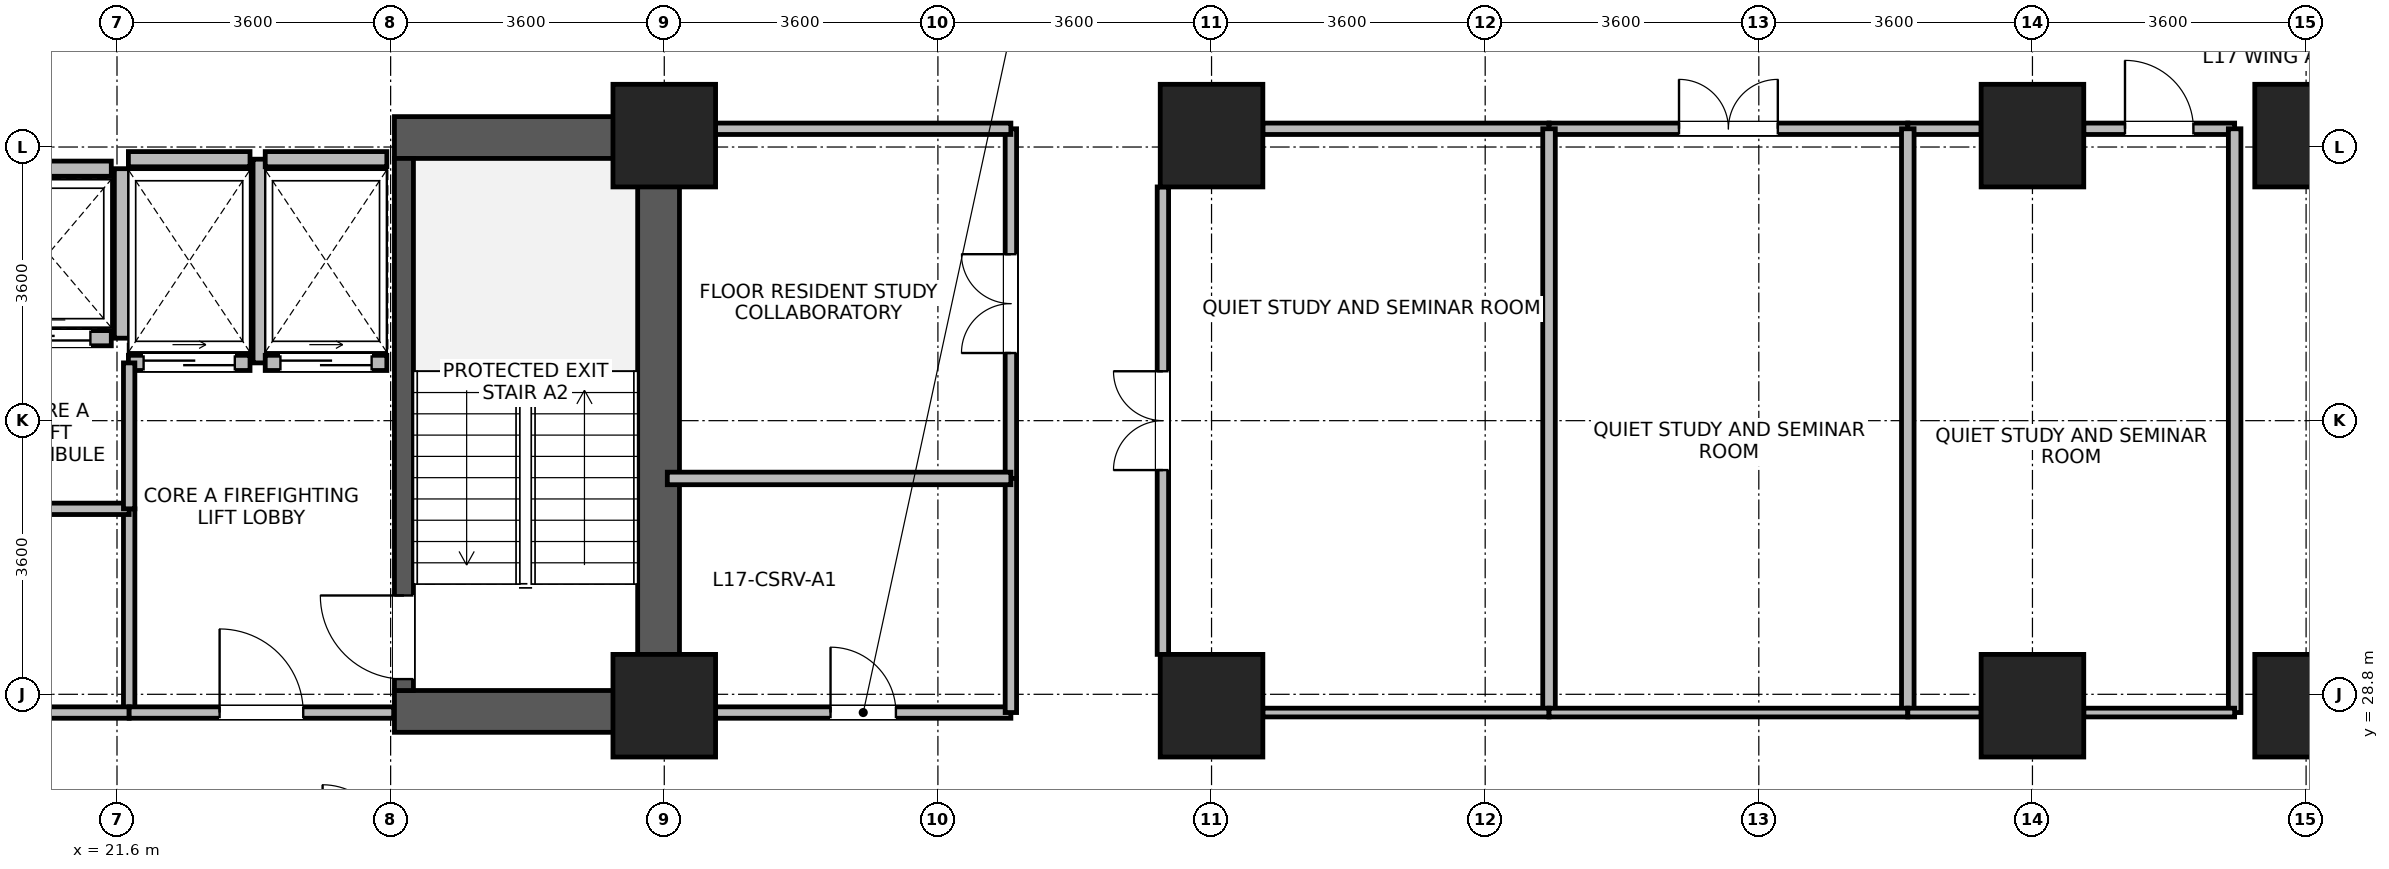
"""IFC4 building model, lengths in metres.
Left out: names, types, materials, properties, quantities, classifications, styles, units other than length and angle.
Written with IfcOpenShell. Run it as: python <this file> out.ifc"""

import sys

from ifc_helpers import new_model, si_unit, direction, frame, frame_2d, origin, origin_2d, place, context, subcontext, project, spatial, rectangle, extrude, source, transform, mapped, element, fill, save


model = new_model("IFC4")
c1 = context("Model", 3, precision=1e-05, world=origin(), true_north=direction((0.0, 1.0)))
c2 = subcontext(c1, "Body", "Model", "MODEL_VIEW")
j1 = project(units=[si_unit("LENGTHUNIT", "METRE"), si_unit("PLANEANGLEUNIT", "RADIAN")], contexts=[c1])
p1 = place(None, origin())
s1 = spatial("IfcSite", under=j1, at=p1, CompositionType="ELEMENT")
p2 = place(p1, origin())
s2 = spatial("IfcBuilding", under=s1, at=p2, CompositionType="ELEMENT")
p3 = place(p2, frame((0.0, 0.0, 69.7)))
s3 = spatial("IfcBuildingStorey", under=s2, at=p3, CompositionType="ELEMENT", Elevation=69.7)
p4 = place(p3, frame((28.725, 28.3, 0.0), z_axis=(0.0, 0.0, 1.0), x_axis=(0.0, 1.0, 0.0)))
e1 = element("IfcWall", 1, at=p4, inside=s3, PredefinedType="SHEAR", context=c2, shape_type="SweptSolid", body=[
    extrude(rectangle(XDim=8.1, YDim=0.55, at=frame_2d((4.05, 0.0))), origin(), (0.0, 0.0, 1.0), 3.34),
])
for number, where, z_axis, x_axis in (
    (2, (25.25, 28.575, 0.0), (0.0, 0.0, 1.0), (1.0, 0.0, 0.0)),
    (3, (25.25, 36.125, 0.0), (0.0, 0.0, 1.0), (1.0, 0.0, 0.0)),
):
    element("IfcWall", number, at=place(p3, frame(where, z_axis=z_axis, x_axis=x_axis)), inside=s3, PredefinedType="SHEAR", context=c2, shape_type="SweptSolid", body=[
        extrude(rectangle(XDim=3.2, YDim=0.55, at=frame_2d((1.6, 0.0))), origin(), (0.0, 0.0, 1.0), 3.34),
    ])
p5 = place(p3, frame((25.375, 28.85, 0.0), z_axis=(0.0, 0.0, 1.0), x_axis=(0.0, 1.0, 0.0)))
e4 = element("IfcWall", 4, at=p5, inside=s3, PredefinedType="SHEAR", context=c2, shape_type="SweptSolid", body=[
    extrude(rectangle(XDim=7.0, YDim=0.25, at=frame_2d((3.5, 0.0))), origin(), (0.0, 0.0, 1.0), 3.34),
])
p6 = place(p5, frame((0.15, 0.0, 0.0)))
e5 = element("IfcOpeningElement", 5, at=p6, cuts=e4, PredefinedType="OPENING", context=c2, shape_type="SweptSolid", body=[
    extrude(rectangle(XDim=1.1, YDim=2.08, at=frame_2d((0.55, 1.04))), frame((0.0, 0.135, 0.0), z_axis=(0.0, -1.0, 0.0), x_axis=(1.0, 0.0, 0.0)), (0.0, 0.0, 1.0), 0.27),
])
m1 = source(origin(), c2, "Body", "SweptSolid", [
    extrude(rectangle(XDim=1.35, YDim=1.35, at=origin_2d()), origin(), (0.0, 0.0, 1.0), 3.7),
])
for number, where, z_axis, x_axis in (
    (6, (28.8, 28.65, 0.0), (0.0, 0.0, 1.0), (1.0, 0.0, 0.0)),
    (7, (28.8, 36.15, 0.0), (0.0, 0.0, 1.0), (1.0, 0.0, 0.0)),
    (8, (36.0, 28.65, 0.0), (0.0, 0.0, 1.0), (1.0, 0.0, 0.0)),
    (9, (36.0, 36.15, 0.0), (0.0, 0.0, 1.0), (1.0, 0.0, 0.0)),
    (10, (46.8, 28.65, 0.0), (0.0, 0.0, 1.0), (1.0, 0.0, 0.0)),
    (11, (46.8, 36.15, 0.0), (0.0, 0.0, 1.0), (1.0, 0.0, 0.0)),
    (12, (50.4, 28.65, 0.0), (0.0, 0.0, 1.0), (1.0, 0.0, 0.0)),
    (13, (50.4, 36.15, 0.0), (0.0, 0.0, 1.0), (1.0, 0.0, 0.0)),
):
    element("IfcColumn", number, at=place(p3, frame(where, z_axis=z_axis, x_axis=x_axis)), inside=s3, PredefinedType="COLUMN", context=c2, shape_type="MappedRepresentation", body=[
        mapped(m1, transform((0.0, 0.0, 0.0), x_axis=(1.0, 0.0, 0.0), y_axis=(0.0, 1.0, 0.0), z_axis=(0.0, 0.0, 1.0), scale=1.0)),
    ])
p7 = place(p3, frame((19.875, 33.485, 0.0), z_axis=(0.0, 0.0, 1.0), x_axis=(1.0, 0.0, 0.0)))
e14 = element("IfcWall", 14, at=p7, inside=s3, PredefinedType="PARTITIONING", context=c2, shape_type="SweptSolid", body=[
    extrude(rectangle(XDim=1.65, YDim=0.2, at=frame_2d((0.825, 0.0))), origin(), (0.0, 0.0, 1.0), 3.32),
])
p8 = place(p7, frame((0.275, 0.0, 0.0)))
e15 = element("IfcOpeningElement", 15, at=p8, cuts=e14, PredefinedType="OPENING", context=c2, shape_type="SweptSolid", body=[
    extrude(rectangle(XDim=1.1, YDim=2.12, at=frame_2d((0.55, 1.06))), frame((0.0, 0.11, 0.0), z_axis=(0.0, -1.0, 0.0), x_axis=(1.0, 0.0, 0.0)), (0.0, 0.0, 1.0), 0.22),
])
p9 = place(p3, frame((19.875, 35.715, 0.0), z_axis=(0.0, 0.0, 1.0), x_axis=(1.0, 0.0, 0.0)))
e16 = element("IfcWall", 16, at=p9, inside=s3, PredefinedType="PARTITIONING", context=c2, shape_type="SweptSolid", body=[
    extrude(rectangle(XDim=1.65, YDim=0.2, at=frame_2d((0.825, 0.0))), origin(), (0.0, 0.0, 1.0), 2.12),
])
p10 = place(p3, frame((21.665, 33.485, 0.0), z_axis=(0.0, 0.0, 1.0), x_axis=(0.0, 1.0, 0.0)))
e17 = element("IfcWall", 17, at=p10, inside=s3, PredefinedType="PARTITIONING", context=c2, shape_type="SweptSolid", body=[
    extrude(rectangle(XDim=2.23, YDim=0.2, at=frame_2d((1.115, 0.0))), origin(), (0.0, 0.0, 1.0), 3.32),
])
p11 = place(p3, frame((21.75, 33.16, 0.0), z_axis=(0.0, 0.0, 1.0), x_axis=(1.0, 0.0, 0.0)))
e18 = element("IfcWall", 18, at=p11, inside=s3, PredefinedType="PARTITIONING", context=c2, shape_type="SweptSolid", body=[
    extrude(rectangle(XDim=1.6, YDim=0.2, at=frame_2d((0.8, 0.0))), origin(), (0.0, 0.0, 1.0), 3.32),
])
p12 = place(p11, frame((0.2, 0.0, 0.0)))
e19 = element("IfcOpeningElement", 19, at=p12, cuts=e18, PredefinedType="OPENING", context=c2, shape_type="SweptSolid", body=[
    extrude(rectangle(XDim=1.2, YDim=2.12, at=frame_2d((0.6, 1.06))), frame((0.0, 0.11, 0.0), z_axis=(0.0, -1.0, 0.0), x_axis=(1.0, 0.0, 0.0)), (0.0, 0.0, 1.0), 0.22),
])
p13 = place(p3, frame((21.75, 35.84, 0.0), z_axis=(0.0, 0.0, 1.0), x_axis=(1.0, 0.0, 0.0)))
e20 = element("IfcWall", 20, at=p13, inside=s3, PredefinedType="PARTITIONING", context=c2, shape_type="SweptSolid", body=[
    extrude(rectangle(XDim=1.6, YDim=0.2, at=frame_2d((0.8, 0.0))), origin(), (0.0, 0.0, 1.0), 2.12),
])
p14 = place(p3, frame((23.49, 33.16, 0.0), z_axis=(0.0, 0.0, 1.0), x_axis=(0.0, 1.0, 0.0)))
e21 = element("IfcWall", 21, at=p14, inside=s3, PredefinedType="PARTITIONING", context=c2, shape_type="SweptSolid", body=[
    extrude(rectangle(XDim=2.68, YDim=0.2, at=frame_2d((1.34, 0.0))), origin(), (0.0, 0.0, 1.0), 3.32),
])
p15 = place(p3, frame((23.55, 33.16, 0.0), z_axis=(0.0, 0.0, 1.0), x_axis=(1.0, 0.0, 0.0)))
e22 = element("IfcWall", 22, at=p15, inside=s3, PredefinedType="PARTITIONING", context=c2, shape_type="SweptSolid", body=[
    extrude(rectangle(XDim=1.6, YDim=0.2, at=frame_2d((0.8, 0.0))), origin(), (0.0, 0.0, 1.0), 3.32),
])
p16 = place(p15, frame((0.2, 0.0, 0.0)))
e23 = element("IfcOpeningElement", 23, at=p16, cuts=e22, PredefinedType="OPENING", context=c2, shape_type="SweptSolid", body=[
    extrude(rectangle(XDim=1.2, YDim=2.12, at=frame_2d((0.6, 1.06))), frame((0.0, 0.11, 0.0), z_axis=(0.0, -1.0, 0.0), x_axis=(1.0, 0.0, 0.0)), (0.0, 0.0, 1.0), 0.22),
])
p17 = place(p3, frame((23.55, 35.84, 0.0), z_axis=(0.0, 0.0, 1.0), x_axis=(1.0, 0.0, 0.0)))
e24 = element("IfcWall", 24, at=p17, inside=s3, PredefinedType="PARTITIONING", context=c2, shape_type="SweptSolid", body=[
    extrude(rectangle(XDim=1.6, YDim=0.2, at=frame_2d((0.8, 0.0))), origin(), (0.0, 0.0, 1.0), 2.12),
])
p18 = place(p3, frame((35.36, 29.325, 0.0), z_axis=(0.0, 0.0, 1.0), x_axis=(0.0, 1.0, 0.0)))
e25 = element("IfcWall", 25, at=p18, inside=s3, PredefinedType="PARTITIONING", context=c2, shape_type="SweptSolid", body=[
    extrude(rectangle(XDim=6.15, YDim=0.15, at=frame_2d((3.075, 0.0))), origin(), (0.0, 0.0, 1.0), 3.32),
])
p19 = place(p18, frame((2.425, 0.0, 0.0)))
e26 = element("IfcOpeningElement", 26, at=p19, cuts=e25, PredefinedType="OPENING", context=c2, shape_type="SweptSolid", body=[
    extrude(rectangle(XDim=1.3, YDim=2.12, at=frame_2d((0.65, 1.06))), frame((0.0, 0.085, 0.0), z_axis=(0.0, -1.0, 0.0), x_axis=(1.0, 0.0, 0.0)), (0.0, 0.0, 1.0), 0.17),
])
p20 = place(p3, frame((36.675, 36.24, 0.0), z_axis=(0.0, 0.0, 1.0), x_axis=(1.0, 0.0, 0.0)))
e27 = element("IfcWall", 27, at=p20, inside=s3, PredefinedType="PARTITIONING", context=c2, shape_type="SweptSolid", body=[
    extrude(rectangle(XDim=3.765, YDim=0.15, at=frame_2d((1.882, 0.0))), origin(), (0.0, 0.0, 1.0), 2.67),
])
p21 = place(p3, frame((40.44, 36.24, 0.0), z_axis=(0.0, 0.0, 1.0), x_axis=(1.0, 0.0, 0.0)))
e28 = element("IfcWall", 28, at=p21, inside=s3, PredefinedType="PARTITIONING", context=c2, shape_type="SweptSolid", body=[
    extrude(rectangle(XDim=4.72, YDim=0.15, at=frame_2d((2.36, 0.0))), origin(), (0.0, 0.0, 1.0), 2.67),
])
p22 = place(p21, frame((1.71, 0.0, 0.0)))
e29 = element("IfcOpeningElement", 29, at=p22, cuts=e28, PredefinedType="OPENING", context=c2, shape_type="SweptSolid", body=[
    extrude(rectangle(XDim=1.3, YDim=2.12, at=frame_2d((0.65, 1.06))), frame((0.0, 0.085, 0.0), z_axis=(0.0, -1.0, 0.0), x_axis=(1.0, 0.0, 0.0)), (0.0, 0.0, 1.0), 0.17),
])
p23 = place(p3, frame((33.36, 31.64, 0.0), z_axis=(0.0, 0.0, 1.0), x_axis=(0.0, 1.0, 0.0)))
e30 = element("IfcWall", 30, at=p23, inside=s3, PredefinedType="PARTITIONING", context=c2, shape_type="SweptSolid", body=[
    extrude(rectangle(XDim=4.6, YDim=0.15, at=frame_2d((2.3, 0.0))), origin(), (0.0, 0.0, 1.0), 3.32),
])
p24 = place(p23, frame((1.65, 0.0, 0.0)))
e31 = element("IfcOpeningElement", 31, at=p24, cuts=e30, PredefinedType="OPENING", context=c2, shape_type="SweptSolid", body=[
    extrude(rectangle(XDim=1.3, YDim=2.12, at=frame_2d((0.65, 1.06))), frame((0.0, 0.085, 0.0), z_axis=(0.0, -1.0, 0.0), x_axis=(1.0, 0.0, 0.0)), (0.0, 0.0, 1.0), 0.17),
])
p25 = place(p3, frame((29.475, 28.56, 0.0), z_axis=(0.0, 0.0, 1.0), x_axis=(1.0, 0.0, 0.0)))
e32 = element("IfcWall", 32, at=p25, inside=s3, PredefinedType="PARTITIONING", context=c2, shape_type="SweptSolid", body=[
    extrude(rectangle(XDim=3.885, YDim=0.15, at=frame_2d((1.942, 0.0))), origin(), (0.0, 0.0, 1.0), 2.67),
])
p26 = place(p25, frame((1.512, 0.0, 0.0)))
e33 = element("IfcOpeningElement", 33, at=p26, cuts=e32, PredefinedType="OPENING", context=c2, shape_type="SweptSolid", body=[
    extrude(rectangle(XDim=0.86, YDim=2.02, at=frame_2d((0.43, 1.01))), frame((0.0, 0.085, 0.0), z_axis=(0.0, -1.0, 0.0), x_axis=(1.0, 0.0, 0.0)), (0.0, 0.0, 1.0), 0.17),
])
p27 = place(p3, frame((29.475, 36.24, 0.0), z_axis=(0.0, 0.0, 1.0), x_axis=(1.0, 0.0, 0.0)))
e34 = element("IfcWall", 34, at=p27, inside=s3, PredefinedType="PARTITIONING", context=c2, shape_type="SweptSolid", body=[
    extrude(rectangle(XDim=3.885, YDim=0.15, at=frame_2d((1.942, 0.0))), origin(), (0.0, 0.0, 1.0), 2.67),
])
p28 = place(p3, frame((45.16, 36.24, 0.0), z_axis=(0.0, 0.0, 1.0), x_axis=(1.0, 0.0, 0.0)))
e35 = element("IfcWall", 35, at=p28, inside=s3, PredefinedType="PARTITIONING", context=c2, shape_type="SweptSolid", body=[
    extrude(rectangle(XDim=0.965, YDim=0.15, at=frame_2d((0.482, 0.0))), origin(), (0.0, 0.0, 1.0), 2.67),
])
p29 = place(p3, frame((47.475, 36.24, 0.0), z_axis=(0.0, 0.0, 1.0), x_axis=(1.0, 0.0, 0.0)))
e36 = element("IfcWall", 36, at=p29, inside=s3, PredefinedType="PARTITIONING", context=c2, shape_type="SweptSolid", body=[
    extrude(rectangle(XDim=1.985, YDim=0.15, at=frame_2d((0.992, 0.0))), origin(), (0.0, 0.0, 1.0), 2.67),
])
p30 = place(p29, frame((0.542, 0.0, 0.0)))
e37 = element("IfcOpeningElement", 37, at=p30, cuts=e36, PredefinedType="OPENING", context=c2, shape_type="SweptSolid", body=[
    extrude(rectangle(XDim=0.9, YDim=2.08, at=frame_2d((0.45, 1.04))), frame((0.0, 0.085, 0.0), z_axis=(0.0, -1.0, 0.0), x_axis=(1.0, 0.0, 0.0)), (0.0, 0.0, 1.0), 0.17),
])
p31 = place(p3, frame((33.36, 28.56, 0.0), z_axis=(0.0, 0.0, 1.0), x_axis=(0.0, 1.0, 0.0)))
e38 = element("IfcWall", 38, at=p31, inside=s3, PredefinedType="PARTITIONING", context=c2, shape_type="SweptSolid", body=[
    extrude(rectangle(XDim=3.08, YDim=0.15, at=frame_2d((1.54, 0.0))), origin(), (0.0, 0.0, 1.0), 3.32),
])
p32 = place(p3, frame((21.76, 28.56, 0.0), z_axis=(0.0, 0.0, 1.0), x_axis=(0.0, 1.0, 0.0)))
e39 = element("IfcWall", 39, at=p32, inside=s3, PredefinedType="PARTITIONING", context=c2, shape_type="SweptSolid", body=[
    extrude(rectangle(XDim=2.68, YDim=0.15, at=frame_2d((1.34, 0.0))), origin(), (0.0, 0.0, 1.0), 3.32),
])
p33 = place(p3, frame((19.76, 28.56, 0.0), z_axis=(0.0, 0.0, 1.0), x_axis=(1.0, 0.0, 0.0)))
e40 = element("IfcWall", 40, at=p33, inside=s3, PredefinedType="PARTITIONING", context=c2, shape_type="SweptSolid", body=[
    extrude(rectangle(XDim=2.0, YDim=0.15, at=frame_2d((1.0, 0.0))), origin(), (0.0, 0.0, 1.0), 2.12),
])
p34 = place(p3, frame((19.76, 31.24, 0.0), z_axis=(0.0, 0.0, 1.0), x_axis=(1.0, 0.0, 0.0)))
e41 = element("IfcWall", 41, at=p34, inside=s3, PredefinedType="PARTITIONING", context=c2, shape_type="SweptSolid", body=[
    extrude(rectangle(XDim=2.0, YDim=0.15, at=frame_2d((1.0, 0.0))), origin(), (0.0, 0.0, 1.0), 3.32),
])
for number, where, z_axis, x_axis in (
    (42, (40.44, 28.56, 0.0), (0.0, 0.0, 1.0), (0.0, 1.0, 0.0)),
    (43, (45.16, 28.56, 0.0), (0.0, 0.0, 1.0), (0.0, 1.0, 0.0)),
    (44, (49.46, 28.56, 0.0), (0.0, 0.0, 1.0), (0.0, 1.0, 0.0)),
):
    element("IfcWall", number, at=place(p3, frame(where, z_axis=z_axis, x_axis=x_axis)), inside=s3, PredefinedType="PARTITIONING", context=c2, shape_type="SweptSolid", body=[
        extrude(rectangle(XDim=7.68, YDim=0.165, at=frame_2d((3.84, 0.0))), origin(), (0.0, 0.0, 1.0), 3.32),
    ])
p35 = place(p3, frame((36.675, 28.56, 0.0), z_axis=(0.0, 0.0, 1.0), x_axis=(1.0, 0.0, 0.0)))
e45 = element("IfcWall", 45, at=p35, inside=s3, PredefinedType="PARTITIONING", context=c2, shape_type="SweptSolid", body=[
    extrude(rectangle(XDim=3.765, YDim=0.115, at=frame_2d((1.882, 0.0))), origin(), (0.0, 0.0, 1.0), 2.67),
])
p36 = place(p3, frame((40.44, 28.56, 0.0), z_axis=(0.0, 0.0, 1.0), x_axis=(1.0, 0.0, 0.0)))
e46 = element("IfcWall", 46, at=p36, inside=s3, PredefinedType="PARTITIONING", context=c2, shape_type="SweptSolid", body=[
    extrude(rectangle(XDim=4.72, YDim=0.115, at=frame_2d((2.36, 0.0))), origin(), (0.0, 0.0, 1.0), 2.67),
])
p37 = place(p3, frame((28.84, 31.64, 0.0), z_axis=(0.0, 0.0, 1.0), x_axis=(1.0, 0.0, 0.0)))
e47 = element("IfcWall", 47, at=p37, inside=s3, PredefinedType="PARTITIONING", context=c2, shape_type="SweptSolid", body=[
    extrude(rectangle(XDim=4.52, YDim=0.165, at=frame_2d((2.26, 0.0))), origin(), (0.0, 0.0, 1.0), 3.32),
])
p38 = place(p3, frame((45.16, 28.56, 0.0), z_axis=(0.0, 0.0, 1.0), x_axis=(1.0, 0.0, 0.0)))
e48 = element("IfcWall", 48, at=p38, inside=s3, PredefinedType="PARTITIONING", context=c2, shape_type="SweptSolid", body=[
    extrude(rectangle(XDim=0.965, YDim=0.115, at=frame_2d((0.482, 0.0))), origin(), (0.0, 0.0, 1.0), 2.67),
])
p39 = place(p3, frame((47.475, 28.56, 0.0), z_axis=(0.0, 0.0, 1.0), x_axis=(1.0, 0.0, 0.0)))
e49 = element("IfcWall", 49, at=p39, inside=s3, PredefinedType="PARTITIONING", context=c2, shape_type="SweptSolid", body=[
    extrude(rectangle(XDim=1.985, YDim=0.115, at=frame_2d((0.992, 0.0))), origin(), (0.0, 0.0, 1.0), 2.67),
])
p40 = place(p3, frame((21.76, 28.56, 0.0), z_axis=(0.0, 0.0, 1.0), x_axis=(1.0, 0.0, 0.0)))
e50 = element("IfcWall", 50, at=p40, inside=s3, PredefinedType="PARTITIONING", context=c2, shape_type="SweptSolid", body=[
    extrude(rectangle(XDim=3.48, YDim=0.15, at=frame_2d((1.74, 0.0))), origin(), (0.0, 0.0, 1.0), 2.12),
])
p41 = place(p40, frame((1.19, 0.0, 0.0)))
e51 = element("IfcOpeningElement", 51, at=p41, cuts=e50, PredefinedType="OPENING", context=c2, shape_type="SweptSolid", body=[
    extrude(rectangle(XDim=1.1, YDim=2.08, at=frame_2d((0.55, 1.04))), frame((0.0, 0.085, 0.0), z_axis=(0.0, -1.0, 0.0), x_axis=(1.0, 0.0, 0.0)), (0.0, 0.0, 1.0), 0.17),
])
p42 = place(p3, frame((21.76, 31.24, 0.0), z_axis=(0.0, 0.0, 1.0), x_axis=(0.0, 1.0, 0.0)))
e52 = element("IfcWall", 52, at=p42, inside=s3, PredefinedType="PARTITIONING", context=c2, shape_type="SweptSolid", body=[
    extrude(rectangle(XDim=1.92, YDim=0.15, at=frame_2d((0.96, 0.0))), origin(), (0.0, 0.0, 1.0), 3.32),
])
p43 = place(p6, origin())
e53 = element("IfcDoor", 53, at=p43, inside=s3, OperationType="SINGLE_SWING_RIGHT", PredefinedType="DOOR", context=c2, shape_type="SweptSolid", body=[
    extrude(rectangle(XDim=1.1, YDim=2.08, at=frame_2d((0.55, 1.04))), frame((0.0, 0.025, 0.0), z_axis=(0.0, -1.0, 0.0), x_axis=(1.0, 0.0, 0.0)), (0.0, 0.0, 1.0), 0.05),
])
fill(e5, e53)
p44 = place(p8, origin())
e54 = element("IfcDoor", 54, at=p44, inside=s3, OperationType="SLIDING_TO_LEFT", PredefinedType="DOOR", context=c2, shape_type="SweptSolid", body=[
    extrude(rectangle(XDim=1.1, YDim=2.12, at=frame_2d((0.55, 1.06))), frame((0.0, 0.025, 0.0), z_axis=(0.0, -1.0, 0.0), x_axis=(1.0, 0.0, 0.0)), (0.0, 0.0, 1.0), 0.05),
])
fill(e15, e54)
p45 = place(p12, origin())
e55 = element("IfcDoor", 55, at=p45, inside=s3, OperationType="SLIDING_TO_RIGHT", PredefinedType="DOOR", context=c2, shape_type="SweptSolid", body=[
    extrude(rectangle(XDim=1.2, YDim=2.12, at=frame_2d((0.6, 1.06))), frame((0.0, 0.025, 0.0), z_axis=(0.0, -1.0, 0.0), x_axis=(1.0, 0.0, 0.0)), (0.0, 0.0, 1.0), 0.05),
])
fill(e19, e55)
p46 = place(p16, origin())
e56 = element("IfcDoor", 56, at=p46, inside=s3, OperationType="SLIDING_TO_RIGHT", PredefinedType="DOOR", context=c2, shape_type="SweptSolid", body=[
    extrude(rectangle(XDim=1.2, YDim=2.12, at=frame_2d((0.6, 1.06))), frame((0.0, 0.025, 0.0), z_axis=(0.0, -1.0, 0.0), x_axis=(1.0, 0.0, 0.0)), (0.0, 0.0, 1.0), 0.05),
])
fill(e23, e56)
p47 = place(p19, origin())
e57 = element("IfcDoor", 57, at=p47, inside=s3, OperationType="DOUBLE_DOOR_SINGLE_SWING", PredefinedType="DOOR", context=c2, shape_type="SweptSolid", body=[
    extrude(rectangle(XDim=1.3, YDim=2.12, at=frame_2d((0.65, 1.06))), frame((0.0, 0.025, 0.0), z_axis=(0.0, -1.0, 0.0), x_axis=(1.0, 0.0, 0.0)), (0.0, 0.0, 1.0), 0.05),
])
fill(e26, e57)
p48 = place(p22, origin())
e58 = element("IfcDoor", 58, at=p48, inside=s3, OperationType="DOUBLE_DOOR_SINGLE_SWING", PredefinedType="DOOR", context=c2, shape_type="SweptSolid", body=[
    extrude(rectangle(XDim=1.3, YDim=2.12, at=frame_2d((0.65, 1.06))), frame((0.0, 0.025, 0.0), z_axis=(0.0, -1.0, 0.0), x_axis=(1.0, 0.0, 0.0)), (0.0, 0.0, 1.0), 0.05),
])
fill(e29, e58)
p49 = place(p24, origin())
e59 = element("IfcDoor", 59, at=p49, inside=s3, OperationType="DOUBLE_DOOR_SINGLE_SWING", PredefinedType="DOOR", context=c2, shape_type="SweptSolid", body=[
    extrude(rectangle(XDim=1.3, YDim=2.12, at=frame_2d((0.65, 1.06))), frame((0.0, 0.025, 0.0), z_axis=(0.0, -1.0, 0.0), x_axis=(1.0, 0.0, 0.0)), (0.0, 0.0, 1.0), 0.05),
])
fill(e31, e59)
p50 = place(p26, origin())
e60 = element("IfcDoor", 60, at=p50, inside=s3, OperationType="SINGLE_SWING_LEFT", PredefinedType="DOOR", context=c2, shape_type="SweptSolid", body=[
    extrude(rectangle(XDim=0.86, YDim=2.02, at=frame_2d((0.43, 1.01))), frame((0.0, 0.025, 0.0), z_axis=(0.0, -1.0, 0.0), x_axis=(1.0, 0.0, 0.0)), (0.0, 0.0, 1.0), 0.05),
])
fill(e33, e60)
p51 = place(p30, origin())
e61 = element("IfcDoor", 61, at=p51, inside=s3, OperationType="SINGLE_SWING_LEFT", PredefinedType="DOOR", context=c2, shape_type="SweptSolid", body=[
    extrude(rectangle(XDim=0.9, YDim=2.08, at=frame_2d((0.45, 1.04))), frame((0.0, 0.025, 0.0), z_axis=(0.0, -1.0, 0.0), x_axis=(1.0, 0.0, 0.0)), (0.0, 0.0, 1.0), 0.05),
])
fill(e37, e61)
p52 = place(p41, origin())
e62 = element("IfcDoor", 62, at=p52, inside=s3, OperationType="SINGLE_SWING_LEFT", PredefinedType="DOOR", context=c2, shape_type="SweptSolid", body=[
    extrude(rectangle(XDim=1.1, YDim=2.08, at=frame_2d((0.55, 1.04))), frame((0.0, 0.025, 0.0), z_axis=(0.0, -1.0, 0.0), x_axis=(1.0, 0.0, 0.0)), (0.0, 0.0, 1.0), 0.05),
])
fill(e51, e62)
save(model, sys.argv[1])
